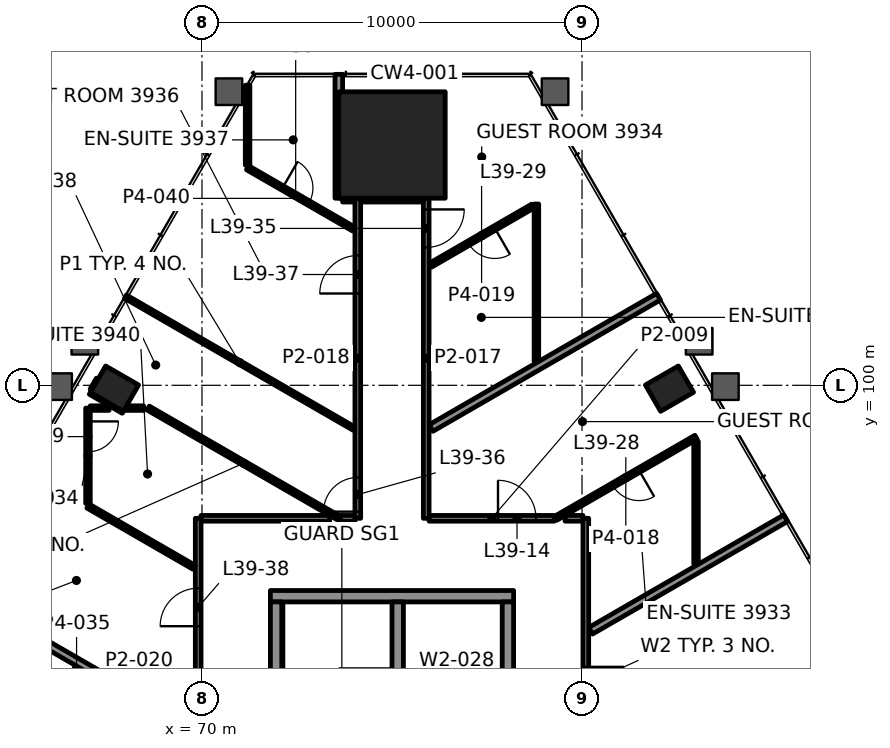
"""IFC4 building model, lengths in metres.
Left out: names, types, materials, properties, quantities, classifications, styles, units other than length and angle.
Written with IfcOpenShell. Run it as: python <this file> out.ifc"""

import sys

from ifc_helpers import new_model, si_unit, direction, frame, frame_2d, origin, origin_2d, place, context, subcontext, project, spatial, rectangle, hollow_rectangle, extrude, element, fill, save


model = new_model("IFC4")
c1 = context("Model", 3, precision=1e-05, world=origin(), true_north=direction((0.0, 1.0)))
c2 = subcontext(c1, "Body", "Model", "MODEL_VIEW")
j1 = project(units=[si_unit("LENGTHUNIT", "METRE"), si_unit("PLANEANGLEUNIT", "RADIAN")], contexts=[c1])
p1 = place(None, origin())
s1 = spatial("IfcSite", under=j1, at=p1, CompositionType="ELEMENT")
p2 = place(p1, origin())
s2 = spatial("IfcBuilding", under=s1, at=p2, CompositionType="ELEMENT")
p3 = place(p2, frame((0.0, 0.0, 171.4)))
s3 = spatial("IfcBuildingStorey", under=s2, at=p3, CompositionType="ELEMENT", Elevation=171.4)
p4 = place(p3, frame((75.0, 106.323, 0.0), z_axis=(0.0, 0.0, 1.0), x_axis=(-1.0, 0.0, 0.0)))
e1 = element("IfcColumn", 1, at=p4, inside=s3, PredefinedType="COLUMN", context=c2, shape_type="SweptSolid", body=[
    extrude(rectangle(XDim=2.8, YDim=2.8, at=origin_2d()), origin(), (0.0, 0.0, 1.0), 3.9),
])
for number, where, z_axis, x_axis in (
    (2, (82.302, 99.912, -0.0), (0.0, 0.0, 1.0), (-0.5, 0.866, 0.0)),
    (3, (67.698, 99.912, -0.0), (0.0, 0.0, 1.0), (-0.5, -0.866, 0.0)),
):
    element("IfcColumn", number, at=place(p3, frame(where, z_axis=z_axis, x_axis=x_axis)), inside=s3, PredefinedType="COLUMN", context=c2, shape_type="SweptSolid", body=[
        extrude(hollow_rectangle(XDim=0.8, YDim=1.0, WallThickness=0.05, at=origin_2d()), origin(), (0.0, 0.0, 1.0), 3.9),
    ])
p5 = place(p3, frame((71.8, 94.45, 0.0), z_axis=(0.0, 0.0, 1.0), x_axis=(1.0, 0.0, 0.0)))
e4 = element("IfcWall", 4, at=p5, inside=s3, PredefinedType="SHEAR", context=c2, shape_type="SweptSolid", body=[
    extrude(rectangle(XDim=6.4, YDim=0.3, at=frame_2d((3.2, 0.0))), origin(), (0.0, 0.0, 1.0), 3.7),
])
for number, where, z_axis, x_axis in (
    (5, (71.95, 88.1, 0.0), (0.0, 0.0, 1.0), (0.0, 1.0, 0.0)),
    (6, (78.05, 88.1, 0.0), (0.0, 0.0, 1.0), (0.0, 1.0, 0.0)),
):
    element("IfcWall", number, at=place(p3, frame(where, z_axis=z_axis, x_axis=x_axis)), inside=s3, PredefinedType="SHEAR", context=c2, shape_type="SweptSolid", body=[
        extrude(rectangle(XDim=6.2, YDim=0.3, at=frame_2d((3.1, 0.0))), origin(), (0.0, 0.0, 1.0), 3.7),
    ])
p6 = place(p3, frame((75.15, 88.1, 0.0), z_axis=(0.0, 0.0, 1.0), x_axis=(0.0, 1.0, 0.0)))
e7 = element("IfcWall", 7, at=p6, inside=s3, PredefinedType="SHEAR", context=c2, shape_type="SweptSolid", body=[
    extrude(rectangle(XDim=6.2, YDim=0.3, at=frame_2d((3.1, 0.0))), origin(), (0.0, 0.0, 1.0), 3.7),
])
p7 = place(p6, frame((0.185, 0.0, 0.0)))
e8 = element("IfcOpeningElement", 8, at=p7, cuts=e7, PredefinedType="OPENING", context=c2, shape_type="SweptSolid", body=[
    extrude(rectangle(XDim=1.0, YDim=2.1, at=frame_2d((0.5, 1.05))), frame((0.0, 0.16, 0.0), z_axis=(0.0, -1.0, 0.0), x_axis=(1.0, 0.0, 0.0)), (0.0, 0.0, 1.0), 0.32),
])
p8 = place(p3, frame((69.975, 96.5, 0.0), z_axis=(0.0, 0.0, 1.0), x_axis=(1.0, 0.0, 0.0)))
e9 = element("IfcWall", 9, at=p8, inside=s3, PredefinedType="PARTITIONING", context=c2, shape_type="SweptSolid", body=[
    extrude(rectangle(XDim=3.384, YDim=0.15, at=frame_2d((1.692, 0.0))), origin(), (0.0, 0.0, 1.0), 3.1),
])
p9 = place(p3, frame((75.975, 96.5, 0.0), z_axis=(0.0, 0.0, 1.0), x_axis=(1.0, 0.0, 0.0)))
e10 = element("IfcWall", 10, at=p9, inside=s3, PredefinedType="PARTITIONING", context=c2, shape_type="SweptSolid", body=[
    extrude(rectangle(XDim=3.299, YDim=0.15, at=frame_2d((1.649, 0.0))), origin(), (0.0, 0.0, 1.0), 3.1),
])
p10 = place(p9, frame((1.814, 0.0, 0.0)))
e11 = element("IfcOpeningElement", 11, at=p10, cuts=e10, PredefinedType="OPENING", context=c2, shape_type="SweptSolid", body=[
    extrude(rectangle(XDim=1.0, YDim=2.1, at=frame_2d((0.5, 1.05))), frame((0.0, 0.085, 0.0), z_axis=(0.0, -1.0, 0.0), x_axis=(1.0, 0.0, 0.0)), (0.0, 0.0, 1.0), 0.17),
])
p11 = place(p3, frame((67.06, 99.4, 0.0), z_axis=(0.0, 0.0, 1.0), x_axis=(1.0, 0.0, 0.0)))
e12 = element("IfcWall", 12, at=p11, inside=s3, PredefinedType="PARTITIONING", context=c2, shape_type="SweptSolid", body=[
    extrude(rectangle(XDim=0.496, YDim=0.12, at=frame_2d((0.248, 0.0))), origin(), (0.0, 0.0, 1.0), 3.022),
])
p12 = place(p3, frame((67.98, 99.4, 0.0), z_axis=(0.0, 0.0, 1.0), x_axis=(1.0, 0.0, 0.0)))
e13 = element("IfcWall", 13, at=p12, inside=s3, PredefinedType="PARTITIONING", context=c2, shape_type="SweptSolid", body=[
    extrude(rectangle(XDim=0.486, YDim=0.12, at=frame_2d((0.243, 0.0))), origin(), (0.0, 0.0, 1.0), 3.1),
])
p13 = place(p3, frame((73.7, 104.923, 0.0), z_axis=(0.0, 0.0, 1.0), x_axis=(1.0, 0.0, 0.0)))
e14 = element("IfcWall", 14, at=p13, inside=s3, PredefinedType="PARTITIONING", context=c2, shape_type="SweptSolid", body=[
    extrude(rectangle(XDim=0.324, YDim=0.2, at=frame_2d((0.162, 0.0))), origin(), (0.0, 0.0, 1.0), 3.1),
])
p14 = place(p3, frame((80.227, 93.541, 0.0), z_axis=(0.0, 0.0, 1.0), x_axis=(0.866041507197, 0.499972107033, 0.0)))
e15 = element("IfcWall", 15, at=p14, inside=s3, PredefinedType="PARTITIONING", context=c2, shape_type="SweptSolid", body=[
    extrude(rectangle(XDim=5.926, YDim=0.2, at=frame_2d((2.963, 0.0))), origin(), (0.0, 0.0, 1.0), 3.022),
])
p15 = place(p3, frame((83.0, 98.634, 0.0), z_axis=(0.0, 0.0, 1.0), x_axis=(-0.866013160285, -0.500021205763, 0.0)))
e16 = element("IfcWall", 16, at=p15, inside=s3, PredefinedType="PARTITIONING", context=c2, shape_type="SweptSolid", body=[
    extrude(rectangle(XDim=4.268, YDim=0.12, at=frame_2d((2.134, 0.0))), origin(), (0.0, 0.0, 1.0), 3.022),
])
p16 = place(p15, frame((1.734, 0.0, 0.0)))
e17 = element("IfcOpeningElement", 17, at=p16, cuts=e16, PredefinedType="OPENING", context=c2, shape_type="SweptSolid", body=[
    extrude(rectangle(XDim=0.8, YDim=2.1, at=frame_2d((0.4, 1.05))), frame((0.0, 0.07, 0.0), z_axis=(0.0, -1.0, 0.0), x_axis=(1.0, 0.0, 0.0)), (0.0, 0.0, 1.0), 0.14),
])
p17 = place(p3, frame((76.027, 98.876, 0.0), z_axis=(0.0, 0.0, 1.0), x_axis=(0.866023821458, 0.500002740659, 0.0)))
e18 = element("IfcWall", 18, at=p17, inside=s3, PredefinedType="PARTITIONING", context=c2, shape_type="SweptSolid", body=[
    extrude(rectangle(XDim=6.912, YDim=0.2, at=frame_2d((3.456, 0.0))), origin(), (0.0, 0.0, 1.0), 3.1),
])
p18 = place(p3, frame((78.705, 104.716, 0.0), z_axis=(0.0, 0.0, 1.0), x_axis=(-0.866028856698, -0.499994019331, 0.0)))
e19 = element("IfcWall", 19, at=p18, inside=s3, PredefinedType="PARTITIONING", context=c2, shape_type="SweptSolid", body=[
    extrude(rectangle(XDim=3.113, YDim=0.12, at=frame_2d((1.556, 0.0))), origin(), (0.0, 0.0, 1.0), 3.1),
])
p19 = place(p18, frame((1.156, 0.0, 0.0)))
e20 = element("IfcOpeningElement", 20, at=p19, cuts=e19, PredefinedType="OPENING", context=c2, shape_type="SweptSolid", body=[
    extrude(rectangle(XDim=0.8, YDim=2.1, at=frame_2d((0.4, 1.05))), frame((0.0, 0.07, 0.0), z_axis=(0.0, -1.0, 0.0), x_axis=(1.0, 0.0, 0.0)), (0.0, 0.0, 1.0), 0.14),
])
p20 = place(p3, frame((67.1, 99.877, 0.0), z_axis=(0.0, 0.0, 1.0), x_axis=(0.500277597875, 0.865865073245, 0.0)))
e21 = element("IfcWall", 21, at=p20, inside=s3, PredefinedType="PARTITIONING", context=c2, shape_type="SweptSolid", body=[
    extrude(rectangle(XDim=0.33, YDim=0.1, at=frame_2d((0.165, 0.0))), origin(), (0.0, 0.0, 1.0), 3.1),
])
p21 = place(p3, frame((83.0, 95.297, 0.0), z_axis=(0.0, 0.0, 1.0), x_axis=(0.0, 1.0, 0.0)))
e22 = element("IfcWall", 22, at=p21, inside=s3, PredefinedType="PARTITIONING", context=c2, shape_type="SweptSolid", body=[
    extrude(rectangle(XDim=3.228, YDim=0.12, at=frame_2d((1.614, 0.0))), origin(), (0.0, 0.0, 1.0), 3.022),
])
p22 = place(p3, frame((80.1, 96.5, 0.0), z_axis=(0.0, 0.0, 1.0), x_axis=(0.0, -1.0, 0.0)))
e23 = element("IfcWall", 23, at=p22, inside=s3, PredefinedType="PARTITIONING", context=c2, shape_type="SweptSolid", body=[
    extrude(rectangle(XDim=10.6, YDim=0.15, at=frame_2d((5.3, 0.0))), origin(), (0.0, 0.0, 1.0), 3.022),
])
p23 = place(p22, frame((3.909, 0.0, 0.0)))
e24 = element("IfcOpeningElement", 24, at=p23, cuts=e23, PredefinedType="OPENING", context=c2, shape_type="SweptSolid", body=[
    extrude(rectangle(XDim=1.0, YDim=2.1, at=frame_2d((0.5, 1.05))), frame((0.0, 0.085, 0.0), z_axis=(0.0, -1.0, 0.0), x_axis=(1.0, 0.0, 0.0)), (0.0, 0.0, 1.0), 0.17),
])
p24 = place(p3, frame((78.8, 100.633, 0.0), z_axis=(0.0, 0.0, 1.0), x_axis=(0.0, 1.0, 0.0)))
e25 = element("IfcWall", 25, at=p24, inside=s3, PredefinedType="PARTITIONING", context=c2, shape_type="SweptSolid", body=[
    extrude(rectangle(XDim=4.137, YDim=0.12, at=frame_2d((2.069, 0.0))), origin(), (0.0, 0.0, 1.0), 3.1),
])
p25 = place(p3, frame((75.9, 104.923, 0.0), z_axis=(0.0, 0.0, 1.0), x_axis=(0.0, -1.0, 0.0)))
e26 = element("IfcWall", 26, at=p25, inside=s3, PredefinedType="PARTITIONING", context=c2, shape_type="SweptSolid", body=[
    extrude(rectangle(XDim=8.423, YDim=0.15, at=frame_2d((4.211, 0.0))), origin(), (0.0, 0.0, 1.0), 3.1),
])
p26 = place(p25, frame((0.294, 0.0, 0.0)))
e27 = element("IfcOpeningElement", 27, at=p26, cuts=e26, PredefinedType="OPENING", context=c2, shape_type="SweptSolid", body=[
    extrude(rectangle(XDim=1.0, YDim=2.1, at=frame_2d((0.5, 1.05))), frame((0.0, 0.085, 0.0), z_axis=(0.0, -1.0, 0.0), x_axis=(1.0, 0.0, 0.0)), (0.0, 0.0, 1.0), 0.17),
])
p27 = place(p3, frame((74.1, 96.5, 0.0), z_axis=(0.0, 0.0, 1.0), x_axis=(0.0, 1.0, 0.0)))
e28 = element("IfcWall", 28, at=p27, inside=s3, PredefinedType="PARTITIONING", context=c2, shape_type="SweptSolid", body=[
    extrude(rectangle(XDim=8.424, YDim=0.15, at=frame_2d((4.212, 0.0))), origin(), (0.0, 0.0, 1.0), 3.1),
])
p28 = place(p27, frame((0.175, 0.0, 0.0)))
e29 = element("IfcOpeningElement", 29, at=p28, cuts=e28, PredefinedType="OPENING", context=c2, shape_type="SweptSolid", body=[
    extrude(rectangle(XDim=0.9, YDim=2.1, at=frame_2d((0.45, 1.05))), frame((0.0, 0.085, 0.0), z_axis=(0.0, -1.0, 0.0), x_axis=(1.0, 0.0, 0.0)), (0.0, 0.0, 1.0), 0.17),
])
p29 = place(p27, frame((5.916, 0.0, 0.0)))
e30 = element("IfcOpeningElement", 30, at=p29, cuts=e28, PredefinedType="OPENING", context=c2, shape_type="SweptSolid", body=[
    extrude(rectangle(XDim=1.0, YDim=2.1, at=frame_2d((0.5, 1.05))), frame((0.0, 0.085, 0.0), z_axis=(0.0, -1.0, 0.0), x_axis=(1.0, 0.0, 0.0)), (0.0, 0.0, 1.0), 0.17),
])
p30 = place(p3, frame((73.6, 104.924, 0.0), z_axis=(0.0, 0.0, 1.0), x_axis=(0.0, 1.0, 0.0)))
e31 = element("IfcWall", 31, at=p30, inside=s3, PredefinedType="PARTITIONING", context=c2, shape_type="SweptSolid", body=[
    extrude(rectangle(XDim=3.26, YDim=0.2, at=frame_2d((1.63, 0.0))), origin(), (0.0, 0.0, 1.0), 3.1),
])
p31 = place(p3, frame((71.2, 105.794, 0.0), z_axis=(0.0, 0.0, 1.0), x_axis=(0.0, 1.0, 0.0)))
e32 = element("IfcWall", 32, at=p31, inside=s3, PredefinedType="PARTITIONING", context=c2, shape_type="SweptSolid", body=[
    extrude(rectangle(XDim=2.103, YDim=0.12, at=frame_2d((1.052, 0.0))), origin(), (0.0, 0.0, 1.0), 3.1),
])
p32 = place(p3, frame((69.9, 85.9, 0.0), z_axis=(0.0, 0.0, 1.0), x_axis=(0.0, 1.0, 0.0)))
e33 = element("IfcWall", 33, at=p32, inside=s3, PredefinedType="PARTITIONING", context=c2, shape_type="SweptSolid", body=[
    extrude(rectangle(XDim=10.6, YDim=0.15, at=frame_2d((5.3, 0.0))), origin(), (0.0, 0.0, 1.0), 3.022),
])
p33 = place(p32, frame((7.76, 0.0, 0.0)))
e34 = element("IfcOpeningElement", 34, at=p33, cuts=e33, PredefinedType="OPENING", context=c2, shape_type="SweptSolid", body=[
    extrude(rectangle(XDim=1.0, YDim=2.1, at=frame_2d((0.5, 1.05))), frame((0.0, 0.085, 0.0), z_axis=(0.0, -1.0, 0.0), x_axis=(1.0, 0.0, 0.0)), (0.0, 0.0, 1.0), 0.17),
])
p34 = place(p3, frame((67.0, 99.4, 0.0), z_axis=(0.0, 0.0, 1.0), x_axis=(0.0, -1.0, 0.0)))
e35 = element("IfcWall", 35, at=p34, inside=s3, PredefinedType="PARTITIONING", context=c2, shape_type="SweptSolid", body=[
    extrude(rectangle(XDim=2.508, YDim=0.12, at=frame_2d((1.254, 0.0))), origin(), (0.0, 0.0, 1.0), 3.022),
])
p35 = place(p34, frame((0.35, 0.0, 0.0)))
e36 = element("IfcOpeningElement", 36, at=p35, cuts=e35, PredefinedType="OPENING", context=c2, shape_type="SweptSolid", body=[
    extrude(rectangle(XDim=0.8, YDim=2.1, at=frame_2d((0.4, 1.05))), frame((0.0, 0.07, 0.0), z_axis=(0.0, -1.0, 0.0), x_axis=(1.0, 0.0, 0.0)), (0.0, 0.0, 1.0), 0.14),
])
p36 = place(p3, frame((66.7, 92.572, 0.0), z_axis=(0.0, 0.0, 1.0), x_axis=(0.0, -1.0, 0.0)))
e37 = element("IfcWall", 37, at=p36, inside=s3, PredefinedType="PARTITIONING", context=c2, shape_type="SweptSolid", body=[
    extrude(rectangle(XDim=2.104, YDim=0.12, at=frame_2d((1.052, 0.0))), origin(), (0.0, 0.0, 1.0), 3.1),
])
p37 = place(p36, frame((0.652, 0.0, 0.0)))
e38 = element("IfcOpeningElement", 38, at=p37, cuts=e37, PredefinedType="OPENING", context=c2, shape_type="SweptSolid", body=[
    extrude(rectangle(XDim=0.8, YDim=2.1, at=frame_2d((0.4, 1.05))), frame((0.0, 0.07, 0.0), z_axis=(0.0, -1.0, 0.0), x_axis=(1.0, 0.0, 0.0)), (0.0, 0.0, 1.0), 0.14),
])
p38 = place(p3, frame((71.2, 105.724, 0.0), z_axis=(0.0, 0.0, 1.0), x_axis=(0.86604299788, -0.499969524894, 0.0)))
e39 = element("IfcWall", 39, at=p38, inside=s3, PredefinedType="PARTITIONING", context=c2, shape_type="SweptSolid", body=[
    extrude(rectangle(XDim=3.222, YDim=0.12, at=frame_2d((1.611, 0.0))), origin(), (0.0, 0.0, 1.0), 3.1),
])
p39 = place(p38, frame((1.061, 0.0, 0.0)))
e40 = element("IfcOpeningElement", 40, at=p39, cuts=e39, PredefinedType="OPENING", context=c2, shape_type="SweptSolid", body=[
    extrude(rectangle(XDim=0.8, YDim=2.1, at=frame_2d((0.4, 1.05))), frame((0.0, 0.07, 0.0), z_axis=(0.0, -1.0, 0.0), x_axis=(1.0, 0.0, 0.0)), (0.0, 0.0, 1.0), 0.14),
])
p40 = place(p3, frame((73.999, 98.862, 0.0), z_axis=(0.0, 0.0, 1.0), x_axis=(-0.866026860931, 0.49999747614, 0.0)))
e41 = element("IfcWall", 41, at=p40, inside=s3, PredefinedType="PARTITIONING", context=c2, shape_type="SweptSolid", body=[
    extrude(rectangle(XDim=6.941, YDim=0.1, at=frame_2d((3.471, 0.0))), origin(), (0.0, 0.0, 1.0), 3.1),
])
p41 = place(p3, frame((73.609, 96.5, 0.0), z_axis=(0.0, 0.0, 1.0), x_axis=(-0.866032775405, 0.499987231761, 0.0)))
e42 = element("IfcWall", 42, at=p41, inside=s3, PredefinedType="PARTITIONING", context=c2, shape_type="SweptSolid", body=[
    extrude(rectangle(XDim=5.8, YDim=0.12, at=frame_2d((2.9, 0.0))), origin(), (0.0, 0.0, 1.0), 3.1),
])
p42 = place(p3, frame((67.932, 99.316, 0.0), z_axis=(0.0, 0.0, 1.0), x_axis=(-0.866010750942, 0.50002537861, 0.0)))
e43 = element("IfcWall", 43, at=p42, inside=s3, PredefinedType="PARTITIONING", context=c2, shape_type="SweptSolid", body=[
    extrude(rectangle(XDim=1.0, YDim=0.12, at=frame_2d((0.5, 0.0))), origin(), (0.0, 0.0, 1.0), 3.022),
])
p43 = place(p3, frame((69.79, 95.212, 0.0), z_axis=(0.0, 0.0, 1.0), x_axis=(-0.86604299788, 0.499969524894, 0.0)))
e44 = element("IfcWall", 44, at=p43, inside=s3, PredefinedType="PARTITIONING", context=c2, shape_type="SweptSolid", body=[
    extrude(rectangle(XDim=3.222, YDim=0.12, at=frame_2d((1.611, 0.0))), origin(), (0.0, 0.0, 1.0), 3.1),
])
p44 = place(p3, frame((69.773, 90.953, 0.0), z_axis=(0.0, 0.0, 1.0), x_axis=(-0.866025463095, 0.499999897272, 0.0)))
e45 = element("IfcWall", 45, at=p44, inside=s3, PredefinedType="PARTITIONING", context=c2, shape_type="SweptSolid", body=[
    extrude(rectangle(XDim=7.236, YDim=0.2, at=frame_2d((3.618, 0.0))), origin(), (0.0, 0.0, 1.0), 3.022),
])
p45 = place(p3, frame((73.639, 96.5, 0.0), z_axis=(0.0, 0.0, 1.0), x_axis=(1.0, 0.0, 0.0)))
e46 = element("IfcWall", 46, at=p45, inside=s3, PredefinedType="PARTITIONING", context=c2, shape_type="SweptSolid", body=[
    extrude(rectangle(XDim=0.386, YDim=0.15, at=frame_2d((0.193, 0.0))), origin(), (0.0, 0.0, 1.0), 3.1),
])
p46 = place(p3, frame((79.555, 96.5, 0.0), z_axis=(0.0, 0.0, 1.0), x_axis=(1.0, 0.0, 0.0)))
e47 = element("IfcWall", 47, at=p46, inside=s3, PredefinedType="PARTITIONING", context=c2, shape_type="SweptSolid", body=[
    extrude(rectangle(XDim=0.47, YDim=0.15, at=frame_2d((0.235, 0.0))), origin(), (0.0, 0.0, 1.0), 3.1),
])
p47 = place(p3, frame((74.175, 104.923, 0.0), z_axis=(0.0, 0.0, 1.0), x_axis=(1.0, 0.0, 0.0)))
e48 = element("IfcWall", 48, at=p47, inside=s3, PredefinedType="PARTITIONING", context=c2, shape_type="SweptSolid", body=[
    extrude(rectangle(XDim=1.649, YDim=0.2, at=frame_2d((0.825, 0.0))), origin(), (0.0, 0.0, 1.0), 3.097),
])
p48 = place(p10, origin())
e49 = element("IfcDoor", 49, at=p48, inside=s3, OperationType="SINGLE_SWING_LEFT", PredefinedType="DOOR", context=c2, shape_type="SweptSolid", body=[
    extrude(rectangle(XDim=1.0, YDim=2.1, at=frame_2d((0.5, 1.05))), frame((0.0, 0.025, 0.0), z_axis=(0.0, -1.0, 0.0), x_axis=(1.0, 0.0, 0.0)), (0.0, 0.0, 1.0), 0.05),
])
fill(e11, e49)
p49 = place(p16, origin())
e50 = element("IfcDoor", 50, at=p49, inside=s3, OperationType="SINGLE_SWING_LEFT", PredefinedType="DOOR", context=c2, shape_type="SweptSolid", body=[
    extrude(rectangle(XDim=0.8, YDim=2.1, at=frame_2d((0.4, 1.05))), frame((0.0, 0.025, 0.0), z_axis=(0.0, -1.0, 0.0), x_axis=(1.0, 0.0, 0.0)), (0.0, 0.0, 1.0), 0.05),
])
fill(e17, e50)
p50 = place(p19, origin())
e51 = element("IfcDoor", 51, at=p50, inside=s3, OperationType="SINGLE_SWING_LEFT", PredefinedType="DOOR", context=c2, shape_type="SweptSolid", body=[
    extrude(rectangle(XDim=0.8, YDim=2.1, at=frame_2d((0.4, 1.05))), frame((0.0, 0.025, 0.0), z_axis=(0.0, -1.0, 0.0), x_axis=(1.0, 0.0, 0.0)), (0.0, 0.0, 1.0), 0.05),
])
fill(e20, e51)
p51 = place(p23, origin())
e52 = element("IfcDoor", 52, at=p51, inside=s3, OperationType="SINGLE_SWING_RIGHT", PredefinedType="DOOR", context=c2, shape_type="SweptSolid", body=[
    extrude(rectangle(XDim=1.0, YDim=2.1, at=frame_2d((0.5, 1.05))), frame((0.0, 0.025, 0.0), z_axis=(0.0, -1.0, 0.0), x_axis=(1.0, 0.0, 0.0)), (0.0, 0.0, 1.0), 0.05),
])
fill(e24, e52)
p52 = place(p26, origin())
e53 = element("IfcDoor", 53, at=p52, inside=s3, OperationType="SINGLE_SWING_RIGHT", PredefinedType="DOOR", context=c2, shape_type="SweptSolid", body=[
    extrude(rectangle(XDim=1.0, YDim=2.1, at=frame_2d((0.5, 1.05))), frame((0.0, 0.025, 0.0), z_axis=(0.0, -1.0, 0.0), x_axis=(1.0, 0.0, 0.0)), (0.0, 0.0, 1.0), 0.05),
])
fill(e27, e53)
p53 = place(p28, origin())
e54 = element("IfcDoor", 54, at=p53, inside=s3, OperationType="SINGLE_SWING_LEFT", PredefinedType="DOOR", context=c2, shape_type="SweptSolid", body=[
    extrude(rectangle(XDim=0.9, YDim=2.1, at=frame_2d((0.45, 1.05))), frame((0.0, 0.025, 0.0), z_axis=(0.0, -1.0, 0.0), x_axis=(1.0, 0.0, 0.0)), (0.0, 0.0, 1.0), 0.05),
])
fill(e29, e54)
p54 = place(p29, origin())
e55 = element("IfcDoor", 55, at=p54, inside=s3, OperationType="SINGLE_SWING_LEFT", PredefinedType="DOOR", context=c2, shape_type="SweptSolid", body=[
    extrude(rectangle(XDim=1.0, YDim=2.1, at=frame_2d((0.5, 1.05))), frame((0.0, 0.025, 0.0), z_axis=(0.0, -1.0, 0.0), x_axis=(1.0, 0.0, 0.0)), (0.0, 0.0, 1.0), 0.05),
])
fill(e30, e55)
p55 = place(p33, origin())
e56 = element("IfcDoor", 56, at=p55, inside=s3, OperationType="SINGLE_SWING_RIGHT", PredefinedType="DOOR", context=c2, shape_type="SweptSolid", body=[
    extrude(rectangle(XDim=1.0, YDim=2.1, at=frame_2d((0.5, 1.05))), frame((0.0, 0.025, 0.0), z_axis=(0.0, -1.0, 0.0), x_axis=(1.0, 0.0, 0.0)), (0.0, 0.0, 1.0), 0.05),
])
fill(e34, e56)
p56 = place(p35, origin())
e57 = element("IfcDoor", 57, at=p56, inside=s3, OperationType="SINGLE_SWING_RIGHT", PredefinedType="DOOR", context=c2, shape_type="SweptSolid", body=[
    extrude(rectangle(XDim=0.8, YDim=2.1, at=frame_2d((0.4, 1.05))), frame((0.0, 0.025, 0.0), z_axis=(0.0, -1.0, 0.0), x_axis=(1.0, 0.0, 0.0)), (0.0, 0.0, 1.0), 0.05),
])
fill(e36, e57)
p57 = place(p39, origin())
e58 = element("IfcDoor", 58, at=p57, inside=s3, OperationType="SINGLE_SWING_LEFT", PredefinedType="DOOR", context=c2, shape_type="SweptSolid", body=[
    extrude(rectangle(XDim=0.8, YDim=2.1, at=frame_2d((0.4, 1.05))), frame((0.0, 0.025, 0.0), z_axis=(0.0, -1.0, 0.0), x_axis=(1.0, 0.0, 0.0)), (0.0, 0.0, 1.0), 0.05),
])
fill(e40, e58)
p58 = place(p3, origin())
p59 = place(p58, frame((86.104, 95.277, 0.15), z_axis=(0.0, 0.0, 1.0), x_axis=(-0.5, 0.866025, 0.0)))
p60 = place(p59, origin())
e59 = element("IfcWindow", 59, at=p60, inside=s3, PartitioningType="SINGLE_PANEL", PredefinedType="WINDOW", context=c2, shape_type="SweptSolid", body=[
    extrude(rectangle(XDim=2.912, YDim=3.55, at=frame_2d((1.456, 1.775))), frame((0.0, 0.03, 0.0), z_axis=(0.0, -1.0, 0.0), x_axis=(1.0, 0.0, 0.0)), (0.0, 0.0, 1.0), 0.06),
])
p61 = place(p58, frame((69.841, 105.573, 0.15), z_axis=(0.0, 0.0, 1.0), x_axis=(-0.5, -0.866025, 0.0)))
p62 = place(p61, origin())
e60 = element("IfcWindow", 60, at=p62, inside=s3, PartitioningType="SINGLE_PANEL", PredefinedType="WINDOW", context=c2, shape_type="SweptSolid", body=[
    extrude(rectangle(XDim=2.912, YDim=3.55, at=frame_2d((1.456, 1.775))), frame((0.0, 0.03, 0.0), z_axis=(0.0, -1.0, 0.0), x_axis=(1.0, 0.0, 0.0)), (0.0, 0.0, 1.0), 0.06),
])
save(model, sys.argv[1])
